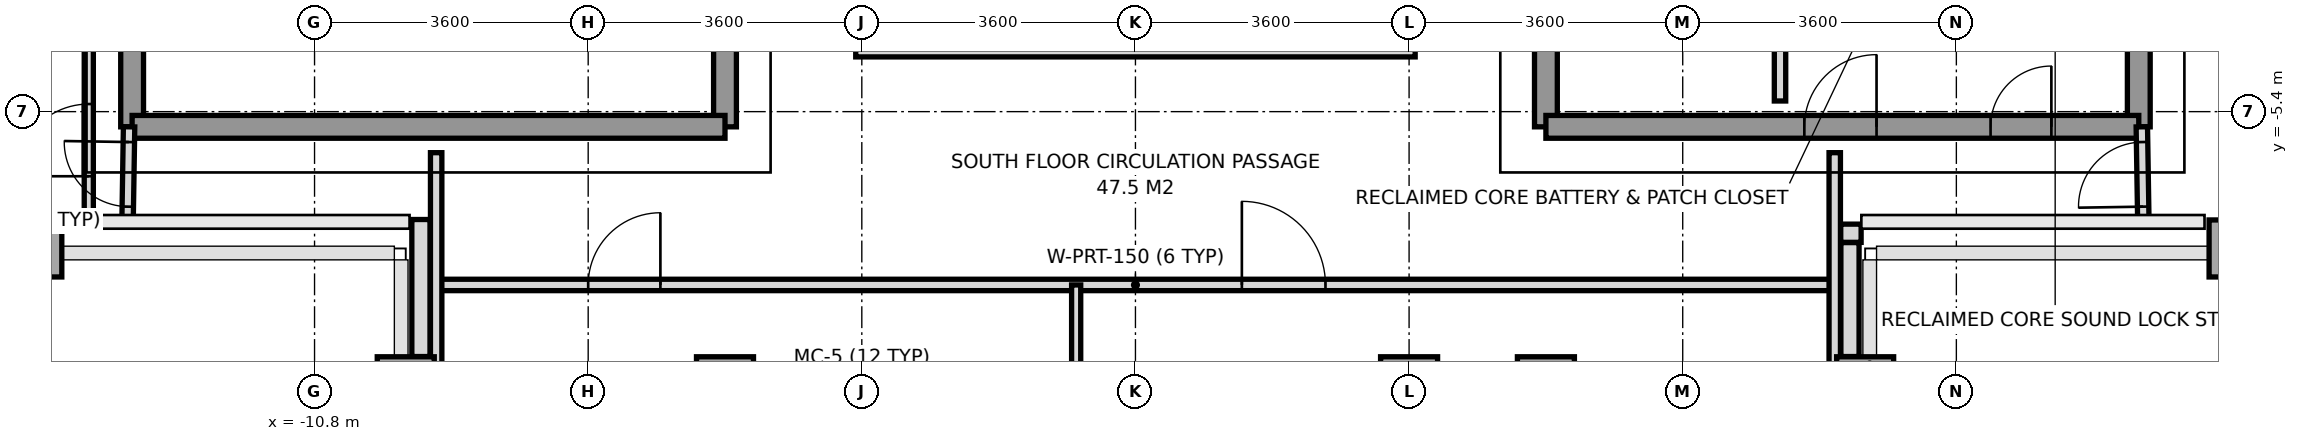
"""IFC4 building model, lengths in metres.
Left out: names, types, materials, properties, quantities, classifications, styles, units other than length and angle.
Written with IfcOpenShell. Run it as: python <this file> out.ifc"""

import sys

from ifc_helpers import new_model, si_unit, direction, frame, frame_2d, origin, origin_2d, place, context, subcontext, project, spatial, rectangle, extrude, source, transform, mapped, element, fill, save


model = new_model("IFC4")
c1 = context("Model", 3, precision=1e-05, world=origin(), true_north=direction((0.0, 1.0)))
c2 = subcontext(c1, "Body", "Model", "MODEL_VIEW")
j1 = project(units=[si_unit("LENGTHUNIT", "METRE"), si_unit("PLANEANGLEUNIT", "RADIAN")], contexts=[c1])
p1 = place(None, origin())
s1 = spatial("IfcSite", under=j1, at=p1, CompositionType="ELEMENT")
p2 = place(p1, origin())
s2 = spatial("IfcBuilding", under=s1, at=p2, CompositionType="ELEMENT")
p3 = place(p2, frame((0.0, 0.0, 239.6)))
s3 = spatial("IfcBuildingStorey", under=s2, at=p3, CompositionType="ELEMENT", Elevation=239.6)
m1 = source(origin(), c2, "Body", "SweptSolid", [
    extrude(rectangle(XDim=0.55, YDim=0.75, at=origin_2d()), origin(), (0.0, 0.0, 1.0), 3.01),
])
p4 = place(p3, frame((-14.4, -7.2, 0.0), z_axis=(0.0, 0.0, 1.0), x_axis=(1.0, 0.0, 0.0)))
e1 = element("IfcColumn", 1, at=p4, inside=s3, PredefinedType="COLUMN", context=c2, shape_type="MappedRepresentation", body=[
    mapped(m1, transform((0.0, 0.0, 0.0), x_axis=(1.0, 0.0, 0.0), y_axis=(0.0, 1.0, 0.0), z_axis=(0.0, 0.0, 1.0), scale=1.0)),
])
m2 = source(origin(), c2, "Body", "SweptSolid", [
    extrude(rectangle(XDim=0.75, YDim=0.75, at=origin_2d()), origin(), (0.0, 0.0, 1.0), 3.01),
])
for number, where, z_axis, x_axis in (
    (2, (-9.6, -9.0, 0.0), (0.0, 0.0, 1.0), (1.0, 0.0, 0.0)),
    (3, (-5.4, -9.0, 0.0), (0.0, 0.0, 1.0), (1.0, 0.0, 0.0)),
    (4, (-3.6, -9.0, 0.0), (0.0, 0.0, 1.0), (1.0, 0.0, 0.0)),
    (5, (3.6, -9.0, 0.0), (0.0, 0.0, 1.0), (1.0, 0.0, 0.0)),
    (6, (5.4, -9.0, 0.0), (0.0, 0.0, 1.0), (1.0, 0.0, 0.0)),
    (7, (9.6, -9.0, 0.0), (0.0, 0.0, 1.0), (1.0, 0.0, 0.0)),
):
    element("IfcColumn", number, at=place(p3, frame(where, z_axis=z_axis, x_axis=x_axis)), inside=s3, PredefinedType="COLUMN", context=c2, shape_type="MappedRepresentation", body=[
        mapped(m2, transform((0.0, 0.0, 0.0), x_axis=(1.0, 0.0, 0.0), y_axis=(0.0, 1.0, 0.0), z_axis=(0.0, 0.0, 1.0), scale=1.0)),
    ])
p5 = place(p3, frame((14.4, -7.2, 0.0), z_axis=(0.0, 0.0, 1.0), x_axis=(1.0, 0.0, 0.0)))
e8 = element("IfcColumn", 8, at=p5, inside=s3, PredefinedType="COLUMN", context=c2, shape_type="MappedRepresentation", body=[
    mapped(m1, transform((0.0, 0.0, 0.0), x_axis=(1.0, 0.0, 0.0), y_axis=(0.0, 1.0, 0.0), z_axis=(0.0, 0.0, 1.0), scale=1.0)),
])
p6 = place(p3, frame((9.547, -7.0, 0.0), z_axis=(0.0, 0.0, 1.0), x_axis=(-1.0, 0.0, 0.0)))
e9 = element("IfcWall", 9, at=p6, inside=s3, PredefinedType="PARAPET", context=c2, shape_type="SweptSolid", body=[
    extrude(rectangle(XDim=0.269, YDim=0.24, at=frame_2d((0.135, 0.0))), origin(), (0.0, 0.0, 1.0), 1.15),
])
p7 = place(p3, frame((9.4, -7.123, 0.0), z_axis=(0.0, 0.0, 1.0), x_axis=(0.0, -1.0, 0.0)))
e10 = element("IfcWall", 10, at=p7, inside=s3, PredefinedType="PARAPET", context=c2, shape_type="SweptSolid", body=[
    extrude(rectangle(XDim=1.499, YDim=0.24, at=frame_2d((0.75, 0.0))), origin(), (0.0, 0.0, 1.0), 1.15),
])
p8 = place(p3, frame((-9.4, -8.622, 0.0), z_axis=(0.0, 0.0, 1.0), x_axis=(0.0, 1.0, 0.0)))
e11 = element("IfcWall", 11, at=p8, inside=s3, PredefinedType="PARAPET", context=c2, shape_type="SweptSolid", body=[
    extrude(rectangle(XDim=1.803, YDim=0.24, at=frame_2d((0.901, 0.0))), origin(), (0.0, 0.0, 1.0), 1.15),
])
p9 = place(p3, frame((-13.2, -5.6, 0.0), z_axis=(0.0, 0.0, 1.0), x_axis=(0.0, 1.0, 0.0)))
e12 = element("IfcWall", 12, at=p9, inside=s3, PredefinedType="SHEAR", context=c2, shape_type="SweptSolid", body=[
    extrude(rectangle(XDim=11.2, YDim=0.3, at=frame_2d((5.6, 0.0))), origin(), (0.0, 0.0, 1.0), 3.01),
])
p10 = place(p3, frame((-5.4, -5.6, 0.0), z_axis=(0.0, 0.0, 1.0), x_axis=(0.0, 1.0, 0.0)))
e13 = element("IfcWall", 13, at=p10, inside=s3, PredefinedType="SHEAR", context=c2, shape_type="SweptSolid", body=[
    extrude(rectangle(XDim=12.5, YDim=0.3, at=frame_2d((6.25, 0.0))), origin(), (0.0, 0.0, 1.0), 3.01),
])
p11 = place(p10, frame((4.55, 0.0, 0.0)))
e14 = element("IfcOpeningElement", 14, at=p11, cuts=e13, PredefinedType="OPENING", context=c2, shape_type="SweptSolid", body=[
    extrude(rectangle(XDim=1.2, YDim=2.2, at=frame_2d((0.6, 1.1))), frame((0.0, 0.16, 0.0), z_axis=(0.0, -1.0, 0.0), x_axis=(1.0, 0.0, 0.0)), (0.0, 0.0, 1.0), 0.32),
])
p12 = place(p10, frame((10.45, 0.0, 0.0)))
e15 = element("IfcOpeningElement", 15, at=p12, cuts=e13, PredefinedType="OPENING", context=c2, shape_type="SweptSolid", body=[
    extrude(rectangle(XDim=1.2, YDim=2.2, at=frame_2d((0.6, 1.1))), frame((0.0, 0.16, 0.0), z_axis=(0.0, -1.0, 0.0), x_axis=(1.0, 0.0, 0.0)), (0.0, 0.0, 1.0), 0.32),
])
p13 = place(p3, frame((-13.2, -5.6, 0.0), z_axis=(0.0, 0.0, 1.0), x_axis=(1.0, 0.0, 0.0)))
e16 = element("IfcWall", 16, at=p13, inside=s3, PredefinedType="SHEAR", context=c2, shape_type="SweptSolid", body=[
    extrude(rectangle(XDim=7.8, YDim=0.3, at=frame_2d((3.9, 0.0))), origin(), (0.0, 0.0, 1.0), 3.01),
])
p14 = place(p3, frame((13.2, -5.6, 0.0), z_axis=(0.0, 0.0, 1.0), x_axis=(0.0, 1.0, 0.0)))
e17 = element("IfcWall", 17, at=p14, inside=s3, PredefinedType="SHEAR", context=c2, shape_type="SweptSolid", body=[
    extrude(rectangle(XDim=11.2, YDim=0.3, at=frame_2d((5.6, 0.0))), origin(), (0.0, 0.0, 1.0), 3.01),
])
p15 = place(p3, frame((5.4, -5.6, 0.0), z_axis=(0.0, 0.0, 1.0), x_axis=(0.0, 1.0, 0.0)))
e18 = element("IfcWall", 18, at=p15, inside=s3, PredefinedType="SHEAR", context=c2, shape_type="SweptSolid", body=[
    extrude(rectangle(XDim=12.5, YDim=0.3, at=frame_2d((6.25, 0.0))), origin(), (0.0, 0.0, 1.0), 3.01),
])
p16 = place(p15, frame((4.55, 0.0, 0.0)))
e19 = element("IfcOpeningElement", 19, at=p16, cuts=e18, PredefinedType="OPENING", context=c2, shape_type="SweptSolid", body=[
    extrude(rectangle(XDim=1.2, YDim=2.2, at=frame_2d((0.6, 1.1))), frame((0.0, 0.16, 0.0), z_axis=(0.0, -1.0, 0.0), x_axis=(1.0, 0.0, 0.0)), (0.0, 0.0, 1.0), 0.32),
])
p17 = place(p15, frame((10.45, 0.0, 0.0)))
e20 = element("IfcOpeningElement", 20, at=p17, cuts=e18, PredefinedType="OPENING", context=c2, shape_type="SweptSolid", body=[
    extrude(rectangle(XDim=1.2, YDim=2.2, at=frame_2d((0.6, 1.1))), frame((0.0, 0.16, 0.0), z_axis=(0.0, -1.0, 0.0), x_axis=(1.0, 0.0, 0.0)), (0.0, 0.0, 1.0), 0.32),
])
p18 = place(p15, frame((7.88, 0.0, 0.0)))
e21 = element("IfcOpeningElement", 21, at=p18, cuts=e18, PredefinedType="OPENING", context=c2, shape_type="SweptSolid", body=[
    extrude(rectangle(XDim=0.8, YDim=2.1, at=frame_2d((0.4, 1.05))), frame((0.0, 0.16, 0.0), z_axis=(0.0, -1.0, 0.0), x_axis=(1.0, 0.0, 0.0)), (0.0, 0.0, 1.0), 0.32),
])
p19 = place(p3, frame((5.4, -5.6, 0.0), z_axis=(0.0, 0.0, 1.0), x_axis=(1.0, 0.0, 0.0)))
e22 = element("IfcWall", 22, at=p19, inside=s3, PredefinedType="SHEAR", context=c2, shape_type="SweptSolid", body=[
    extrude(rectangle(XDim=7.8, YDim=0.3, at=frame_2d((3.9, 0.0))), origin(), (0.0, 0.0, 1.0), 3.01),
])
p20 = place(p19, frame((5.85, 0.0, 0.0)))
e23 = element("IfcOpeningElement", 23, at=p20, cuts=e22, PredefinedType="OPENING", context=c2, shape_type="SweptSolid", body=[
    extrude(rectangle(XDim=0.8, YDim=2.1, at=frame_2d((0.4, 1.05))), frame((0.0, 0.16, 0.0), z_axis=(0.0, -1.0, 0.0), x_axis=(1.0, 0.0, 0.0)), (0.0, 0.0, 1.0), 0.32),
])
p21 = place(p19, frame((3.4, 0.0, 0.0)))
e24 = element("IfcOpeningElement", 24, at=p21, cuts=e22, PredefinedType="OPENING", context=c2, shape_type="SweptSolid", body=[
    extrude(rectangle(XDim=0.95, YDim=2.15, at=frame_2d((0.475, 1.075))), frame((0.0, 0.16, 0.0), z_axis=(0.0, -1.0, 0.0), x_axis=(1.0, 0.0, 0.0)), (0.0, 0.0, 1.0), 0.32),
])
p22 = place(p3, frame((8.48, -5.26, 0.0), z_axis=(0.0, 0.0, 1.0), x_axis=(0.0, 1.0, 0.0)))
e25 = element("IfcWall", 25, at=p22, inside=s3, PredefinedType="PARTITIONING", context=c2, shape_type="SweptSolid", body=[
    extrude(rectangle(XDim=2.94, YDim=0.15, at=frame_2d((1.47, 0.0))), origin(), (0.0, 0.0, 1.0), 3.01),
])
p23 = place(p3, frame((-9.2, -7.68, 0.0), z_axis=(0.0, 0.0, 1.0), x_axis=(1.0, 0.0, 0.0)))
e26 = element("IfcWall", 26, at=p23, inside=s3, PredefinedType="PARTITIONING", context=c2, shape_type="SweptSolid", body=[
    extrude(rectangle(XDim=18.4, YDim=0.15, at=frame_2d((9.2, 0.0))), origin(), (0.0, 0.0, 1.0), 2.57),
])
p24 = place(p23, frame((2.0, 0.0, 0.0)))
e27 = element("IfcOpeningElement", 27, at=p24, cuts=e26, PredefinedType="OPENING", context=c2, shape_type="SweptSolid", body=[
    extrude(rectangle(XDim=0.95, YDim=2.15, at=frame_2d((0.475, 1.075))), frame((0.0, 0.085, 0.0), z_axis=(0.0, -1.0, 0.0), x_axis=(1.0, 0.0, 0.0)), (0.0, 0.0, 1.0), 0.17),
])
p25 = place(p23, frame((10.6, 0.0, 0.0)))
e28 = element("IfcOpeningElement", 28, at=p25, cuts=e26, PredefinedType="OPENING", context=c2, shape_type="SweptSolid", body=[
    extrude(rectangle(XDim=1.1, YDim=2.2, at=frame_2d((0.55, 1.1))), frame((0.0, 0.085, 0.0), z_axis=(0.0, -1.0, 0.0), x_axis=(1.0, 0.0, 0.0)), (0.0, 0.0, 1.0), 0.17),
])
for number, where, z_axis, x_axis in (
    (29, (-9.2, -10.28, 0.0), (0.0, 0.0, 1.0), (0.0, 1.0, 0.0)),
    (30, (9.2, -10.28, 0.0), (0.0, 0.0, 1.0), (0.0, 1.0, 0.0)),
):
    element("IfcWall", number, at=place(p3, frame(where, z_axis=z_axis, x_axis=x_axis)), inside=s3, PredefinedType="PARTITIONING", context=c2, shape_type="SweptSolid", body=[
        extrude(rectangle(XDim=4.34, YDim=0.15, at=frame_2d((2.17, 0.0))), origin(), (0.0, 0.0, 1.0), 2.61),
    ])
p26 = place(p3, frame((-0.78, -19.25, 0.0), z_axis=(0.0, 0.0, 1.0), x_axis=(0.0, 1.0, 0.0)))
e31 = element("IfcWall", 31, at=p26, inside=s3, PredefinedType="PARTITIONING", context=c2, shape_type="SweptSolid", body=[
    extrude(rectangle(XDim=11.57, YDim=0.12, at=frame_2d((5.785, 0.0))), origin(), (0.0, 0.0, 1.0), 2.61),
])
p27 = place(p3, frame((-13.26, -6.85, 0.0), z_axis=(0.0, 0.0, 1.0), x_axis=(0.016013571389, 0.999871774545, 0.0)))
e32 = element("IfcWall", 32, at=p27, inside=s3, PredefinedType="PARTITIONING", context=c2, shape_type="SweptSolid", body=[
    extrude(rectangle(XDim=1.25, YDim=0.15, at=frame_2d((0.625, 0.0))), origin(), (0.0, 0.0, 1.0), 3.01),
])
p28 = place(p27, frame((0.2, 0.0, 0.0)))
e33 = element("IfcOpeningElement", 33, at=p28, cuts=e32, PredefinedType="OPENING", context=c2, shape_type="SweptSolid", body=[
    extrude(rectangle(XDim=0.85, YDim=2.1, at=frame_2d((0.425, 1.05))), frame((0.0, 0.085, 0.0), z_axis=(0.0, -1.0, 0.0), x_axis=(1.0, 0.0, 0.0)), (0.0, 0.0, 1.0), 0.17),
])
p29 = place(p3, frame((-13.77, -6.85, 0.0), z_axis=(0.0, 0.0, 1.0), x_axis=(0.0, 1.0, 0.0)))
e34 = element("IfcWall", 34, at=p29, inside=s3, PredefinedType="PARTITIONING", context=c2, shape_type="SweptSolid", body=[
    extrude(rectangle(XDim=13.7, YDim=0.12, at=frame_2d((6.85, 0.0))), origin(), (0.0, 0.0, 1.0), 2.71),
])
p30 = place(p29, frame((0.6, 0.0, 0.0)))
e35 = element("IfcOpeningElement", 35, at=p30, cuts=e34, PredefinedType="OPENING", context=c2, shape_type="SweptSolid", body=[
    extrude(rectangle(XDim=0.95, YDim=2.15, at=frame_2d((0.475, 1.075))), frame((0.0, 0.07, 0.0), z_axis=(0.0, -1.0, 0.0), x_axis=(1.0, 0.0, 0.0)), (0.0, 0.0, 1.0), 0.14),
])
p31 = place(p3, frame((13.26, -6.85, 0.0), z_axis=(0.0, 0.0, 1.0), x_axis=(-0.016013571389, 0.999871774545, 0.0)))
e36 = element("IfcWall", 36, at=p31, inside=s3, PredefinedType="PARTITIONING", context=c2, shape_type="SweptSolid", body=[
    extrude(rectangle(XDim=1.25, YDim=0.15, at=frame_2d((0.625, 0.0))), origin(), (0.0, 0.0, 1.0), 3.01),
])
p32 = place(p31, frame((0.2, 0.0, 0.0)))
e37 = element("IfcOpeningElement", 37, at=p32, cuts=e36, PredefinedType="OPENING", context=c2, shape_type="SweptSolid", body=[
    extrude(rectangle(XDim=0.85, YDim=2.1, at=frame_2d((0.425, 1.05))), frame((0.0, 0.085, 0.0), z_axis=(0.0, -1.0, 0.0), x_axis=(1.0, 0.0, 0.0)), (0.0, 0.0, 1.0), 0.17),
])
p33 = place(p3, frame((-3.68, -4.56, 0.0), z_axis=(0.0, 0.0, 1.0), x_axis=(1.0, 0.0, 0.0)))
e38 = element("IfcWall", 38, at=p33, inside=s3, PredefinedType="PARAPET", context=c2, shape_type="SweptSolid", body=[
    extrude(rectangle(XDim=7.36, YDim=0.24, at=frame_2d((3.68, 0.0))), origin(), (0.0, 0.0, 1.0), 1.15),
])
m3 = source(origin(), c2, "Body", "SweptSolid", [
    extrude(rectangle(XDim=0.8, YDim=2.1, at=frame_2d((0.4, 1.05))), frame((0.0, 0.025, 0.0), z_axis=(0.0, -1.0, 0.0), x_axis=(1.0, 0.0, 0.0)), (0.0, 0.0, 1.0), 0.05),
])
p34 = place(p20, origin())
e39 = element("IfcDoor", 39, at=p34, inside=s3, OperationType="SINGLE_SWING_RIGHT", PredefinedType="DOOR", context=c2, shape_type="MappedRepresentation", body=[
    mapped(m3, transform((0.0, 0.0, 0.0), x_axis=(1.0, 0.0, 0.0), y_axis=(0.0, 1.0, 0.0), z_axis=(0.0, 0.0, 1.0), scale=1.0)),
])
fill(e23, e39)
m4 = source(origin(), c2, "Body", "SweptSolid", [
    extrude(rectangle(XDim=0.95, YDim=2.15, at=frame_2d((0.475, 1.075))), frame((0.0, 0.025, 0.0), z_axis=(0.0, -1.0, 0.0), x_axis=(1.0, 0.0, 0.0)), (0.0, 0.0, 1.0), 0.05),
])
p35 = place(p21, origin())
e40 = element("IfcDoor", 40, at=p35, inside=s3, OperationType="SINGLE_SWING_RIGHT", PredefinedType="DOOR", context=c2, shape_type="MappedRepresentation", body=[
    mapped(m4, transform((0.0, 0.0, 0.0), x_axis=(1.0, 0.0, 0.0), y_axis=(0.0, 1.0, 0.0), z_axis=(0.0, 0.0, 1.0), scale=1.0)),
])
fill(e24, e40)
p36 = place(p24, origin())
e41 = element("IfcDoor", 41, at=p36, inside=s3, OperationType="SINGLE_SWING_RIGHT", PredefinedType="DOOR", context=c2, shape_type="MappedRepresentation", body=[
    mapped(m4, transform((0.0, 0.0, 0.0), x_axis=(1.0, 0.0, 0.0), y_axis=(0.0, 1.0, 0.0), z_axis=(0.0, 0.0, 1.0), scale=1.0)),
])
fill(e27, e41)
m5 = source(origin(), c2, "Body", "SweptSolid", [
    extrude(rectangle(XDim=1.1, YDim=2.2, at=frame_2d((0.55, 1.1))), frame((0.0, 0.025, 0.0), z_axis=(0.0, -1.0, 0.0), x_axis=(1.0, 0.0, 0.0)), (0.0, 0.0, 1.0), 0.05),
])
p37 = place(p25, origin())
e42 = element("IfcDoor", 42, at=p37, inside=s3, OperationType="SINGLE_SWING_LEFT", PredefinedType="DOOR", context=c2, shape_type="MappedRepresentation", body=[
    mapped(m5, transform((0.0, 0.0, 0.0), x_axis=(1.0, 0.0, 0.0), y_axis=(0.0, 1.0, 0.0), z_axis=(0.0, 0.0, 1.0), scale=1.0)),
])
fill(e28, e42)
p38 = place(p30, origin())
e43 = element("IfcDoor", 43, at=p38, inside=s3, OperationType="SINGLE_SWING_LEFT", PredefinedType="DOOR", context=c2, shape_type="MappedRepresentation", body=[
    mapped(m4, transform((0.0, 0.0, 0.0), x_axis=(1.0, 0.0, 0.0), y_axis=(0.0, 1.0, 0.0), z_axis=(0.0, 0.0, 1.0), scale=1.0)),
])
fill(e35, e43)
m6 = source(origin(), c2, "Body", "SweptSolid", [
    extrude(rectangle(XDim=0.85, YDim=2.1, at=frame_2d((0.425, 1.05))), frame((0.0, 0.025, 0.0), z_axis=(0.0, -1.0, 0.0), x_axis=(1.0, 0.0, 0.0)), (0.0, 0.0, 1.0), 0.05),
])
p39 = place(p28, origin())
e44 = element("IfcDoor", 44, at=p39, inside=s3, OperationType="SINGLE_SWING_RIGHT", PredefinedType="DOOR", context=c2, shape_type="MappedRepresentation", body=[
    mapped(m6, transform((0.0, 0.0, 0.0), x_axis=(1.0, 0.0, 0.0), y_axis=(0.0, 1.0, 0.0), z_axis=(0.0, 0.0, 1.0), scale=1.0)),
])
fill(e33, e44)
p40 = place(p32, origin())
e45 = element("IfcDoor", 45, at=p40, inside=s3, OperationType="SINGLE_SWING_LEFT", PredefinedType="DOOR", context=c2, shape_type="MappedRepresentation", body=[
    mapped(m6, transform((0.0, 0.0, 0.0), x_axis=(1.0, 0.0, 0.0), y_axis=(0.0, 1.0, 0.0), z_axis=(0.0, 0.0, 1.0), scale=1.0)),
])
fill(e37, e45)
save(model, sys.argv[1])
